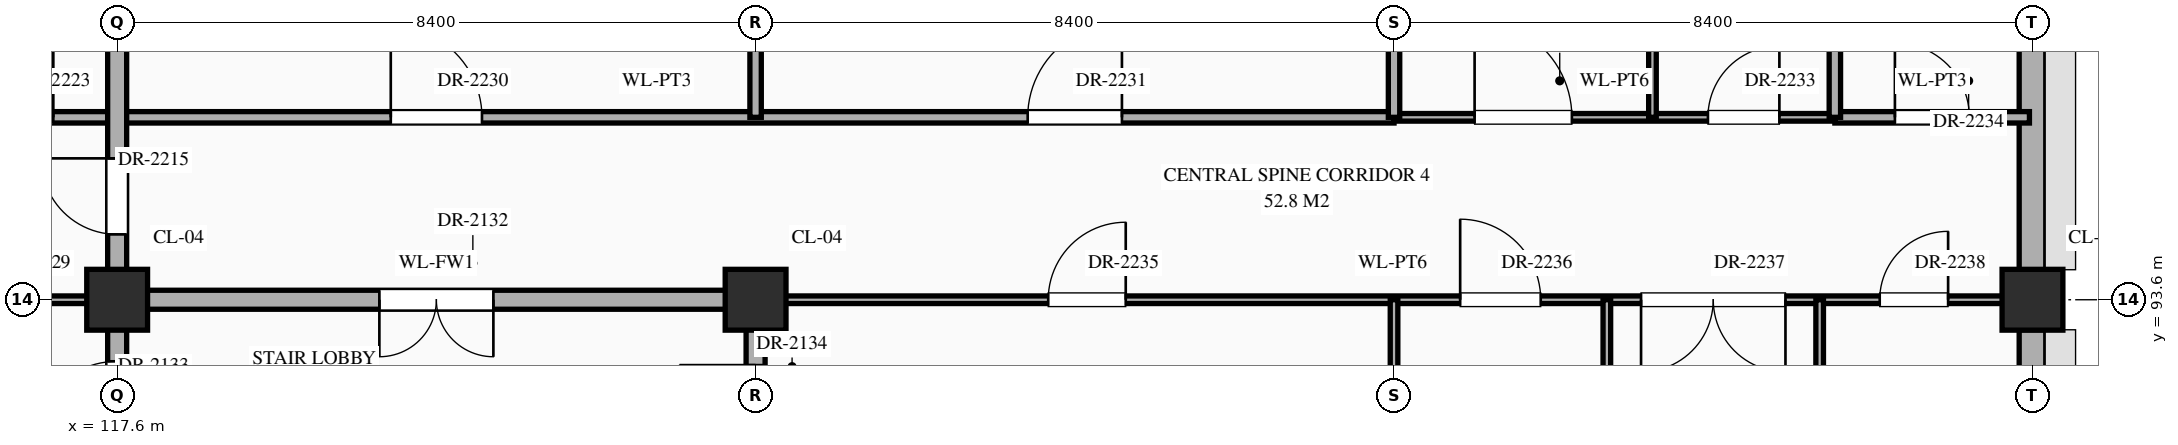
"""IFC4 building model, lengths in metres.
Left out: names, types, materials, properties, quantities, classifications, styles, units other than length and angle.
Written with IfcOpenShell. Run it as: python <this file> out.ifc"""

import sys

from ifc_helpers import new_model, si_unit, direction, frame, frame_2d, origin, origin_2d, place, context, subcontext, project, spatial, rectangle, extrude, element, fill, save


model = new_model("IFC4")
c1 = context("Model", 3, precision=1e-05, world=origin(), true_north=direction((0.0, 1.0)))
c2 = subcontext(c1, "Body", "Model", "MODEL_VIEW")
j1 = project(units=[si_unit("LENGTHUNIT", "METRE"), si_unit("PLANEANGLEUNIT", "RADIAN")], contexts=[c1])
p1 = place(None, origin())
s1 = spatial("IfcSite", under=j1, at=p1, CompositionType="ELEMENT")
p2 = place(p1, origin())
s2 = spatial("IfcBuilding", under=s1, at=p2, CompositionType="ELEMENT")
p3 = place(p2, frame((0.0, 0.0, 26.1)))
s3 = spatial("IfcBuildingStorey", under=s2, at=p3, CompositionType="ELEMENT", Elevation=26.1)
for number, where, z_axis, x_axis in (
    (1, (117.6, 93.6, 0.0), (0.0, 0.0, 1.0), (1.0, 0.0, 0.0)),
    (2, (126.0, 93.6, 0.0), (0.0, 0.0, 1.0), (1.0, 0.0, 0.0)),
    (3, (142.8, 93.6, 0.0), (0.0, 0.0, 1.0), (1.0, 0.0, 0.0)),
):
    element("IfcColumn", number, at=place(p3, frame(where, z_axis=z_axis, x_axis=x_axis)), inside=s3, PredefinedType="COLUMN", context=c2, shape_type="SweptSolid", body=[
        extrude(rectangle(XDim=0.8, YDim=0.8, at=origin_2d()), origin(), (0.0, 0.0, 1.0), 4.5),
    ])
p4 = place(p3, frame((142.8, 86.795, 0.0), z_axis=(0.0, 0.0, 1.0), x_axis=(0.0, 1.0, 0.0)))
e4 = element("IfcWall", 4, at=p4, inside=s3, PredefinedType="STANDARD", context=c2, shape_type="SweptSolid", body=[
    extrude(rectangle(XDim=6.41, YDim=0.35, at=frame_2d((3.205, 0.0))), origin(), (0.0, 0.0, 1.0), 3.59),
])
p5 = place(p4, frame((2.605, 0.0, 0.85)))
e5 = element("IfcOpeningElement", 5, at=p5, cuts=e4, PredefinedType="OPENING", context=c2, shape_type="SweptSolid", body=[
    extrude(rectangle(XDim=1.2, YDim=2.12, at=frame_2d((0.6, 1.06))), frame((0.0, 0.187, 0.0), z_axis=(0.0, -1.0, 0.0), x_axis=(1.0, 0.0, 0.0)), (0.0, 0.0, 1.0), 0.374),
])
p6 = place(p3, frame((142.8, 93.995, 0.0), z_axis=(0.0, 0.0, 1.0), x_axis=(0.0, 1.0, 0.0)))
e6 = element("IfcWall", 6, at=p6, inside=s3, PredefinedType="STANDARD", context=c2, shape_type="SweptSolid", body=[
    extrude(rectangle(XDim=6.41, YDim=0.35, at=frame_2d((3.205, 0.0))), origin(), (0.0, 0.0, 1.0), 3.59),
])
p7 = place(p6, frame((4.055, 0.0, 0.85)))
e7 = element("IfcOpeningElement", 7, at=p7, cuts=e6, PredefinedType="OPENING", context=c2, shape_type="SweptSolid", body=[
    extrude(rectangle(XDim=0.9, YDim=1.2, at=frame_2d((0.45, 0.6))), frame((0.0, 0.187, 0.0), z_axis=(0.0, -1.0, 0.0), x_axis=(1.0, 0.0, 0.0)), (0.0, 0.0, 1.0), 0.374),
])
p8 = place(p3, frame((109.2, 93.6, 0.0), z_axis=(0.0, 0.0, 1.0), x_axis=(1.0, 0.0, 0.0)))
e8 = element("IfcWall", 8, at=p8, inside=s3, PredefinedType="STANDARD", context=c2, shape_type="SweptSolid", body=[
    extrude(rectangle(XDim=8.4, YDim=0.1, at=frame_2d((4.2, 0.0))), origin(), (0.0, 0.0, 1.0), 3.39),
])
p9 = place(p8, frame((1.02, 0.0, 0.0)))
e9 = element("IfcOpeningElement", 9, at=p9, cuts=e8, PredefinedType="OPENING", context=c2, shape_type="SweptSolid", body=[
    extrude(rectangle(XDim=1.08, YDim=2.25, at=frame_2d((0.54, 1.125))), frame((0.0, 0.062, 0.0), z_axis=(0.0, -1.0, 0.0), x_axis=(1.0, 0.0, 0.0)), (0.0, 0.0, 1.0), 0.124),
])
p10 = place(p8, frame((3.64, 0.0, 0.0)))
e10 = element("IfcOpeningElement", 10, at=p10, cuts=e8, PredefinedType="OPENING", context=c2, shape_type="SweptSolid", body=[
    extrude(rectangle(XDim=1.12, YDim=2.25, at=frame_2d((0.56, 1.125))), frame((0.0, 0.062, 0.0), z_axis=(0.0, -1.0, 0.0), x_axis=(1.0, 0.0, 0.0)), (0.0, 0.0, 1.0), 0.124),
])
p11 = place(p8, frame((6.26, 0.0, 0.0)))
e11 = element("IfcOpeningElement", 11, at=p11, cuts=e8, PredefinedType="OPENING", context=c2, shape_type="SweptSolid", body=[
    extrude(rectangle(XDim=1.16, YDim=2.3, at=frame_2d((0.58, 1.15))), frame((0.0, 0.062, 0.0), z_axis=(0.0, -1.0, 0.0), x_axis=(1.0, 0.0, 0.0)), (0.0, 0.0, 1.0), 0.124),
])
p12 = place(p3, frame((117.6, 93.6, 0.0), z_axis=(0.0, 0.0, 1.0), x_axis=(1.0, 0.0, 0.0)))
e12 = element("IfcWall", 12, at=p12, inside=s3, PredefinedType="STANDARD", context=c2, shape_type="SweptSolid", body=[
    extrude(rectangle(XDim=8.4, YDim=0.25, at=frame_2d((4.2, 0.0))), origin(), (0.0, 0.0, 1.0), 3.39),
])
p13 = place(p12, frame((3.45, 0.0, 0.0)))
e13 = element("IfcOpeningElement", 13, at=p13, cuts=e12, PredefinedType="OPENING", context=c2, shape_type="SweptSolid", body=[
    extrude(rectangle(XDim=1.5, YDim=2.25, at=frame_2d((0.75, 1.125))), frame((0.0, 0.137, 0.0), z_axis=(0.0, -1.0, 0.0), x_axis=(1.0, 0.0, 0.0)), (0.0, 0.0, 1.0), 0.274),
])
p14 = place(p3, frame((126.0, 93.6, 0.0), z_axis=(0.0, 0.0, 1.0), x_axis=(1.0, 0.0, 0.0)))
e14 = element("IfcWall", 14, at=p14, inside=s3, PredefinedType="STANDARD", context=c2, shape_type="SweptSolid", body=[
    extrude(rectangle(XDim=16.76, YDim=0.1, at=frame_2d((8.38, 0.0))), origin(), (0.0, 0.0, 1.0), 3.19),
])
p15 = place(p14, frame((3.85, 0.0, 0.0)))
e15 = element("IfcOpeningElement", 15, at=p15, cuts=e14, PredefinedType="OPENING", context=c2, shape_type="SweptSolid", body=[
    extrude(rectangle(XDim=1.02, YDim=2.4, at=frame_2d((0.51, 1.2))), frame((0.0, 0.062, 0.0), z_axis=(0.0, -1.0, 0.0), x_axis=(1.0, 0.0, 0.0)), (0.0, 0.0, 1.0), 0.124),
])
p16 = place(p14, frame((9.27, 0.0, 0.0)))
e16 = element("IfcOpeningElement", 16, at=p16, cuts=e14, PredefinedType="OPENING", context=c2, shape_type="SweptSolid", body=[
    extrude(rectangle(XDim=1.06, YDim=2.4, at=frame_2d((0.53, 1.2))), frame((0.0, 0.062, 0.0), z_axis=(0.0, -1.0, 0.0), x_axis=(1.0, 0.0, 0.0)), (0.0, 0.0, 1.0), 0.124),
])
p17 = place(p14, frame((11.65, 0.0, 0.0)))
e17 = element("IfcOpeningElement", 17, at=p17, cuts=e14, PredefinedType="OPENING", context=c2, shape_type="SweptSolid", body=[
    extrude(rectangle(XDim=1.9, YDim=2.5, at=frame_2d((0.95, 1.25))), frame((0.0, 0.062, 0.0), z_axis=(0.0, -1.0, 0.0), x_axis=(1.0, 0.0, 0.0)), (0.0, 0.0, 1.0), 0.124),
])
p18 = place(p14, frame((14.79, 0.0, 0.0)))
e18 = element("IfcOpeningElement", 18, at=p18, cuts=e14, PredefinedType="OPENING", context=c2, shape_type="SweptSolid", body=[
    extrude(rectangle(XDim=0.9, YDim=2.15, at=frame_2d((0.45, 1.075))), frame((0.0, 0.062, 0.0), z_axis=(0.0, -1.0, 0.0), x_axis=(1.0, 0.0, 0.0)), (0.0, 0.0, 1.0), 0.124),
])
p19 = place(p3, frame((115.0, 96.0, 0.0), z_axis=(0.0, 0.0, 1.0), x_axis=(1.0, 0.0, 0.0)))
e19 = element("IfcWall", 19, at=p19, inside=s3, PredefinedType="STANDARD", context=c2, shape_type="SweptSolid", body=[
    extrude(rectangle(XDim=19.4, YDim=0.15, at=frame_2d((9.7, 0.0))), origin(), (0.0, 0.0, 1.0), 4.24),
])
p20 = place(p19, frame((0.84, 0.0, 0.0)))
e20 = element("IfcOpeningElement", 20, at=p20, cuts=e19, PredefinedType="OPENING", context=c2, shape_type="SweptSolid", body=[
    extrude(rectangle(XDim=0.92, YDim=2.15, at=frame_2d((0.46, 1.075))), frame((0.0, 0.087, 0.0), z_axis=(0.0, -1.0, 0.0), x_axis=(1.0, 0.0, 0.0)), (0.0, 0.0, 1.0), 0.174),
])
p21 = place(p19, frame((6.2, 0.0, 0.0)))
e21 = element("IfcOpeningElement", 21, at=p21, cuts=e19, PredefinedType="OPENING", context=c2, shape_type="SweptSolid", body=[
    extrude(rectangle(XDim=1.2, YDim=2.35, at=frame_2d((0.6, 1.175))), frame((0.0, 0.087, 0.0), z_axis=(0.0, -1.0, 0.0), x_axis=(1.0, 0.0, 0.0)), (0.0, 0.0, 1.0), 0.174),
])
p22 = place(p19, frame((14.58, 0.0, 0.0)))
e22 = element("IfcOpeningElement", 22, at=p22, cuts=e19, PredefinedType="OPENING", context=c2, shape_type="SweptSolid", body=[
    extrude(rectangle(XDim=1.24, YDim=2.3, at=frame_2d((0.62, 1.15))), frame((0.0, 0.087, 0.0), z_axis=(0.0, -1.0, 0.0), x_axis=(1.0, 0.0, 0.0)), (0.0, 0.0, 1.0), 0.174),
])
p23 = place(p3, frame((134.4, 96.0, 0.0), z_axis=(0.0, 0.0, 1.0), x_axis=(1.0, 0.0, 0.0)))
e23 = element("IfcWall", 23, at=p23, inside=s3, PredefinedType="STANDARD", context=c2, shape_type="SweptSolid", body=[
    extrude(rectangle(XDim=5.8, YDim=0.1, at=frame_2d((2.9, 0.0))), origin(), (0.0, 0.0, 1.0), 4.24),
])
p24 = place(p23, frame((1.06, 0.0, 0.0)))
e24 = element("IfcOpeningElement", 24, at=p24, cuts=e23, PredefinedType="OPENING", context=c2, shape_type="SweptSolid", body=[
    extrude(rectangle(XDim=1.28, YDim=2.35, at=frame_2d((0.64, 1.175))), frame((0.0, 0.062, 0.0), z_axis=(0.0, -1.0, 0.0), x_axis=(1.0, 0.0, 0.0)), (0.0, 0.0, 1.0), 0.124),
])
p25 = place(p23, frame((4.13, 0.0, 0.0)))
e25 = element("IfcOpeningElement", 25, at=p25, cuts=e23, PredefinedType="OPENING", context=c2, shape_type="SweptSolid", body=[
    extrude(rectangle(XDim=0.94, YDim=2.3, at=frame_2d((0.47, 1.15))), frame((0.0, 0.062, 0.0), z_axis=(0.0, -1.0, 0.0), x_axis=(1.0, 0.0, 0.0)), (0.0, 0.0, 1.0), 0.124),
])
p26 = place(p3, frame((140.2, 96.0, 0.0), z_axis=(0.0, 0.0, 1.0), x_axis=(1.0, 0.0, 0.0)))
e26 = element("IfcWall", 26, at=p26, inside=s3, PredefinedType="STANDARD", context=c2, shape_type="SweptSolid", body=[
    extrude(rectangle(XDim=2.56, YDim=0.15, at=frame_2d((1.28, 0.0))), origin(), (0.0, 0.0, 1.0), 4.24),
])
p27 = place(p26, frame((0.79, 0.0, 0.0)))
e27 = element("IfcOpeningElement", 27, at=p27, cuts=e26, PredefinedType="OPENING", context=c2, shape_type="SweptSolid", body=[
    extrude(rectangle(XDim=0.98, YDim=2.35, at=frame_2d((0.49, 1.175))), frame((0.0, 0.087, 0.0), z_axis=(0.0, -1.0, 0.0), x_axis=(1.0, 0.0, 0.0)), (0.0, 0.0, 1.0), 0.174),
])
p28 = place(p3, frame((117.6, 91.2, 0.0), z_axis=(0.0, 0.0, 1.0), x_axis=(0.0, 1.0, 0.0)))
e28 = element("IfcWall", 28, at=p28, inside=s3, PredefinedType="STANDARD", context=c2, shape_type="SweptSolid", body=[
    extrude(rectangle(XDim=13.2, YDim=0.25, at=frame_2d((6.6, 0.0))), origin(), (0.0, 0.0, 1.0), 3.49),
])
p29 = place(p28, frame((0.49, 0.0, 0.0)))
e29 = element("IfcOpeningElement", 29, at=p29, cuts=e28, PredefinedType="OPENING", context=c2, shape_type="SweptSolid", body=[
    extrude(rectangle(XDim=1.1, YDim=2.2, at=frame_2d((0.55, 1.1))), frame((0.0, 0.137, 0.0), z_axis=(0.0, -1.0, 0.0), x_axis=(1.0, 0.0, 0.0)), (0.0, 0.0, 1.0), 0.274),
])
p30 = place(p28, frame((10.46, 0.0, 0.0)))
e30 = element("IfcOpeningElement", 30, at=p30, cuts=e28, PredefinedType="OPENING", context=c2, shape_type="SweptSolid", body=[
    extrude(rectangle(XDim=1.0, YDim=2.2, at=frame_2d((0.5, 1.1))), frame((0.0, 0.137, 0.0), z_axis=(0.0, -1.0, 0.0), x_axis=(1.0, 0.0, 0.0)), (0.0, 0.0, 1.0), 0.274),
])
p31 = place(p28, frame((3.26, 0.0, 0.0)))
e31 = element("IfcOpeningElement", 31, at=p31, cuts=e28, PredefinedType="OPENING", context=c2, shape_type="SweptSolid", body=[
    extrude(rectangle(XDim=1.0, YDim=2.2, at=frame_2d((0.5, 1.1))), frame((0.0, 0.137, 0.0), z_axis=(0.0, -1.0, 0.0), x_axis=(1.0, 0.0, 0.0)), (0.0, 0.0, 1.0), 0.274),
])
p32 = place(p3, frame((126.0, 91.2, 0.0), z_axis=(0.0, 0.0, 1.0), x_axis=(0.0, 1.0, 0.0)))
e32 = element("IfcWall", 32, at=p32, inside=s3, PredefinedType="STANDARD", context=c2, shape_type="SweptSolid", body=[
    extrude(rectangle(XDim=2.4, YDim=0.25, at=frame_2d((1.2, 0.0))), origin(), (0.0, 0.0, 1.0), 3.49),
])
p33 = place(p32, frame((0.54, 0.0, 0.0)))
e33 = element("IfcOpeningElement", 33, at=p33, cuts=e32, PredefinedType="OPENING", context=c2, shape_type="SweptSolid", body=[
    extrude(rectangle(XDim=1.0, YDim=2.2, at=frame_2d((0.5, 1.1))), frame((0.0, 0.137, 0.0), z_axis=(0.0, -1.0, 0.0), x_axis=(1.0, 0.0, 0.0)), (0.0, 0.0, 1.0), 0.274),
])
p34 = place(p3, frame((126.0, 96.0, 0.0), z_axis=(0.0, 0.0, 1.0), x_axis=(0.0, 1.0, 0.0)))
e34 = element("IfcWall", 34, at=p34, inside=s3, PredefinedType="STANDARD", context=c2, shape_type="SweptSolid", body=[
    extrude(rectangle(XDim=4.8, YDim=0.15, at=frame_2d((2.4, 0.0))), origin(), (0.0, 0.0, 1.0), 3.49),
])
p35 = place(p3, frame((134.4, 86.4, 0.0), z_axis=(0.0, 0.0, 1.0), x_axis=(0.0, 1.0, 0.0)))
e35 = element("IfcWall", 35, at=p35, inside=s3, PredefinedType="STANDARD", context=c2, shape_type="SweptSolid", body=[
    extrude(rectangle(XDim=7.2, YDim=0.1, at=frame_2d((3.6, 0.0))), origin(), (0.0, 0.0, 1.0), 4.24),
])
p36 = place(p3, frame((134.4, 96.0, 0.0), z_axis=(0.0, 0.0, 1.0), x_axis=(0.0, 1.0, 0.0)))
e36 = element("IfcWall", 36, at=p36, inside=s3, PredefinedType="STANDARD", context=c2, shape_type="SweptSolid", body=[
    extrude(rectangle(XDim=4.8, YDim=0.15, at=frame_2d((2.4, 0.0))), origin(), (0.0, 0.0, 1.0), 4.24),
])
p37 = place(p3, frame((137.2, 86.4, 0.0), z_axis=(0.0, 0.0, 1.0), x_axis=(0.0, 1.0, 0.0)))
e37 = element("IfcWall", 37, at=p37, inside=s3, PredefinedType="STANDARD", context=c2, shape_type="SweptSolid", body=[
    extrude(rectangle(XDim=7.2, YDim=0.1, at=frame_2d((3.6, 0.0))), origin(), (0.0, 0.0, 1.0), 4.24),
])
p38 = place(p37, frame((3.03, 0.0, 0.0)))
e38 = element("IfcOpeningElement", 38, at=p38, cuts=e37, PredefinedType="OPENING", context=c2, shape_type="SweptSolid", body=[
    extrude(rectangle(XDim=1.14, YDim=2.4, at=frame_2d((0.57, 1.2))), frame((0.0, 0.062, 0.0), z_axis=(0.0, -1.0, 0.0), x_axis=(1.0, 0.0, 0.0)), (0.0, 0.0, 1.0), 0.124),
])
p39 = place(p3, frame((137.8, 96.0, 0.0), z_axis=(0.0, 0.0, 1.0), x_axis=(0.0, 1.0, 0.0)))
e39 = element("IfcWall", 39, at=p39, inside=s3, PredefinedType="STANDARD", context=c2, shape_type="SweptSolid", body=[
    extrude(rectangle(XDim=4.8, YDim=0.1, at=frame_2d((2.4, 0.0))), origin(), (0.0, 0.0, 1.0), 4.24),
])
p40 = place(p39, frame((1.8, 0.0, 0.0)))
e40 = element("IfcOpeningElement", 40, at=p40, cuts=e39, PredefinedType="OPENING", context=c2, shape_type="SweptSolid", body=[
    extrude(rectangle(XDim=1.2, YDim=2.35, at=frame_2d((0.6, 1.175))), frame((0.0, 0.062, 0.0), z_axis=(0.0, -1.0, 0.0), x_axis=(1.0, 0.0, 0.0)), (0.0, 0.0, 1.0), 0.124),
])
p41 = place(p3, frame((140.0, 86.4, 0.0), z_axis=(0.0, 0.0, 1.0), x_axis=(0.0, 1.0, 0.0)))
e41 = element("IfcWall", 41, at=p41, inside=s3, PredefinedType="STANDARD", context=c2, shape_type="SweptSolid", body=[
    extrude(rectangle(XDim=7.2, YDim=0.1, at=frame_2d((3.6, 0.0))), origin(), (0.0, 0.0, 1.0), 4.24),
])
p42 = place(p41, frame((3.17, 0.0, 0.0)))
e42 = element("IfcOpeningElement", 42, at=p42, cuts=e41, PredefinedType="OPENING", context=c2, shape_type="SweptSolid", body=[
    extrude(rectangle(XDim=0.86, YDim=2.1, at=frame_2d((0.43, 1.05))), frame((0.0, 0.062, 0.0), z_axis=(0.0, -1.0, 0.0), x_axis=(1.0, 0.0, 0.0)), (0.0, 0.0, 1.0), 0.124),
])
p43 = place(p3, frame((140.2, 96.0, 0.0), z_axis=(0.0, 0.0, 1.0), x_axis=(0.0, 1.0, 0.0)))
e43 = element("IfcWall", 43, at=p43, inside=s3, PredefinedType="STANDARD", context=c2, shape_type="SweptSolid", body=[
    extrude(rectangle(XDim=4.8, YDim=0.15, at=frame_2d((2.4, 0.0))), origin(), (0.0, 0.0, 1.0), 4.24),
])
p44 = place(p43, frame((1.78, 0.0, 0.0)))
e44 = element("IfcOpeningElement", 44, at=p44, cuts=e43, PredefinedType="OPENING", context=c2, shape_type="SweptSolid", body=[
    extrude(rectangle(XDim=1.24, YDim=2.3, at=frame_2d((0.62, 1.15))), frame((0.0, 0.087, 0.0), z_axis=(0.0, -1.0, 0.0), x_axis=(1.0, 0.0, 0.0)), (0.0, 0.0, 1.0), 0.174),
])
p45 = place(p13, frame((1.5, 0.0, 0.0), z_axis=(0.0, 0.0, 1.0), x_axis=(-1.0, 0.0, 0.0)))
e45 = element("IfcDoor", 45, at=p45, inside=s3, OperationType="DOUBLE_DOOR_SINGLE_SWING", PredefinedType="DOOR", context=c2, shape_type="SweptSolid", body=[
    extrude(rectangle(XDim=1.5, YDim=2.25, at=frame_2d((0.75, 1.125))), frame((0.0, 0.025, 0.0), z_axis=(0.0, -1.0, 0.0), x_axis=(1.0, 0.0, 0.0)), (0.0, 0.0, 1.0), 0.05),
])
fill(e13, e45)
p46 = place(p29, origin())
e46 = element("IfcDoor", 46, at=p46, inside=s3, OperationType="SINGLE_SWING_LEFT", PredefinedType="DOOR", context=c2, shape_type="SweptSolid", body=[
    extrude(rectangle(XDim=1.1, YDim=2.2, at=frame_2d((0.55, 1.1))), frame((0.0, 0.025, 0.0), z_axis=(0.0, -1.0, 0.0), x_axis=(1.0, 0.0, 0.0)), (0.0, 0.0, 1.0), 0.05),
])
fill(e29, e46)
p47 = place(p31, origin())
e47 = element("IfcDoor", 47, at=p47, inside=s3, OperationType="SINGLE_SWING_RIGHT", PredefinedType="DOOR", context=c2, shape_type="SweptSolid", body=[
    extrude(rectangle(XDim=1.0, YDim=2.2, at=frame_2d((0.5, 1.1))), frame((0.0, 0.025, 0.0), z_axis=(0.0, -1.0, 0.0), x_axis=(1.0, 0.0, 0.0)), (0.0, 0.0, 1.0), 0.05),
])
fill(e31, e47)
p48 = place(p20, origin())
e48 = element("IfcDoor", 48, at=p48, inside=s3, OperationType="SINGLE_SWING_RIGHT", PredefinedType="DOOR", context=c2, shape_type="SweptSolid", body=[
    extrude(rectangle(XDim=0.92, YDim=2.15, at=frame_2d((0.46, 1.075))), frame((0.0, 0.025, 0.0), z_axis=(0.0, -1.0, 0.0), x_axis=(1.0, 0.0, 0.0)), (0.0, 0.0, 1.0), 0.05),
])
fill(e20, e48)
p49 = place(p21, origin())
e49 = element("IfcDoor", 49, at=p49, inside=s3, OperationType="SINGLE_SWING_LEFT", PredefinedType="DOOR", context=c2, shape_type="SweptSolid", body=[
    extrude(rectangle(XDim=1.2, YDim=2.35, at=frame_2d((0.6, 1.175))), frame((0.0, 0.025, 0.0), z_axis=(0.0, -1.0, 0.0), x_axis=(1.0, 0.0, 0.0)), (0.0, 0.0, 1.0), 0.05),
])
fill(e21, e49)
p50 = place(p22, origin())
e50 = element("IfcDoor", 50, at=p50, inside=s3, OperationType="SINGLE_SWING_RIGHT", PredefinedType="DOOR", context=c2, shape_type="SweptSolid", body=[
    extrude(rectangle(XDim=1.24, YDim=2.3, at=frame_2d((0.62, 1.15))), frame((0.0, 0.025, 0.0), z_axis=(0.0, -1.0, 0.0), x_axis=(1.0, 0.0, 0.0)), (0.0, 0.0, 1.0), 0.05),
])
fill(e22, e50)
p51 = place(p24, origin())
e51 = element("IfcDoor", 51, at=p51, inside=s3, OperationType="SINGLE_SWING_LEFT", PredefinedType="DOOR", context=c2, shape_type="SweptSolid", body=[
    extrude(rectangle(XDim=1.28, YDim=2.35, at=frame_2d((0.64, 1.175))), frame((0.0, 0.025, 0.0), z_axis=(0.0, -1.0, 0.0), x_axis=(1.0, 0.0, 0.0)), (0.0, 0.0, 1.0), 0.05),
])
fill(e24, e51)
p52 = place(p25, origin())
e52 = element("IfcDoor", 52, at=p52, inside=s3, OperationType="SINGLE_SWING_RIGHT", PredefinedType="DOOR", context=c2, shape_type="SweptSolid", body=[
    extrude(rectangle(XDim=0.94, YDim=2.3, at=frame_2d((0.47, 1.15))), frame((0.0, 0.025, 0.0), z_axis=(0.0, -1.0, 0.0), x_axis=(1.0, 0.0, 0.0)), (0.0, 0.0, 1.0), 0.05),
])
fill(e25, e52)
p53 = place(p27, origin())
e53 = element("IfcDoor", 53, at=p53, inside=s3, OperationType="SINGLE_SWING_LEFT", PredefinedType="DOOR", context=c2, shape_type="SweptSolid", body=[
    extrude(rectangle(XDim=0.98, YDim=2.35, at=frame_2d((0.49, 1.175))), frame((0.0, 0.025, 0.0), z_axis=(0.0, -1.0, 0.0), x_axis=(1.0, 0.0, 0.0)), (0.0, 0.0, 1.0), 0.05),
])
fill(e27, e53)
p54 = place(p15, origin())
e54 = element("IfcDoor", 54, at=p54, inside=s3, OperationType="SINGLE_SWING_RIGHT", PredefinedType="DOOR", context=c2, shape_type="SweptSolid", body=[
    extrude(rectangle(XDim=1.02, YDim=2.4, at=frame_2d((0.51, 1.2))), frame((0.0, 0.025, 0.0), z_axis=(0.0, -1.0, 0.0), x_axis=(1.0, 0.0, 0.0)), (0.0, 0.0, 1.0), 0.05),
])
fill(e15, e54)
p55 = place(p16, origin())
e55 = element("IfcDoor", 55, at=p55, inside=s3, OperationType="SINGLE_SWING_LEFT", PredefinedType="DOOR", context=c2, shape_type="SweptSolid", body=[
    extrude(rectangle(XDim=1.06, YDim=2.4, at=frame_2d((0.53, 1.2))), frame((0.0, 0.025, 0.0), z_axis=(0.0, -1.0, 0.0), x_axis=(1.0, 0.0, 0.0)), (0.0, 0.0, 1.0), 0.05),
])
fill(e16, e55)
p56 = place(p17, frame((1.9, 0.0, 0.0), z_axis=(0.0, 0.0, 1.0), x_axis=(-1.0, 0.0, 0.0)))
e56 = element("IfcDoor", 56, at=p56, inside=s3, OperationType="DOUBLE_DOOR_SINGLE_SWING", PredefinedType="DOOR", context=c2, shape_type="SweptSolid", body=[
    extrude(rectangle(XDim=1.9, YDim=2.5, at=frame_2d((0.95, 1.25))), frame((0.0, 0.025, 0.0), z_axis=(0.0, -1.0, 0.0), x_axis=(1.0, 0.0, 0.0)), (0.0, 0.0, 1.0), 0.05),
])
fill(e17, e56)
p57 = place(p18, origin())
e57 = element("IfcDoor", 57, at=p57, inside=s3, OperationType="SINGLE_SWING_RIGHT", PredefinedType="DOOR", context=c2, shape_type="SweptSolid", body=[
    extrude(rectangle(XDim=0.9, YDim=2.15, at=frame_2d((0.45, 1.075))), frame((0.0, 0.025, 0.0), z_axis=(0.0, -1.0, 0.0), x_axis=(1.0, 0.0, 0.0)), (0.0, 0.0, 1.0), 0.05),
])
fill(e18, e57)
save(model, sys.argv[1])
